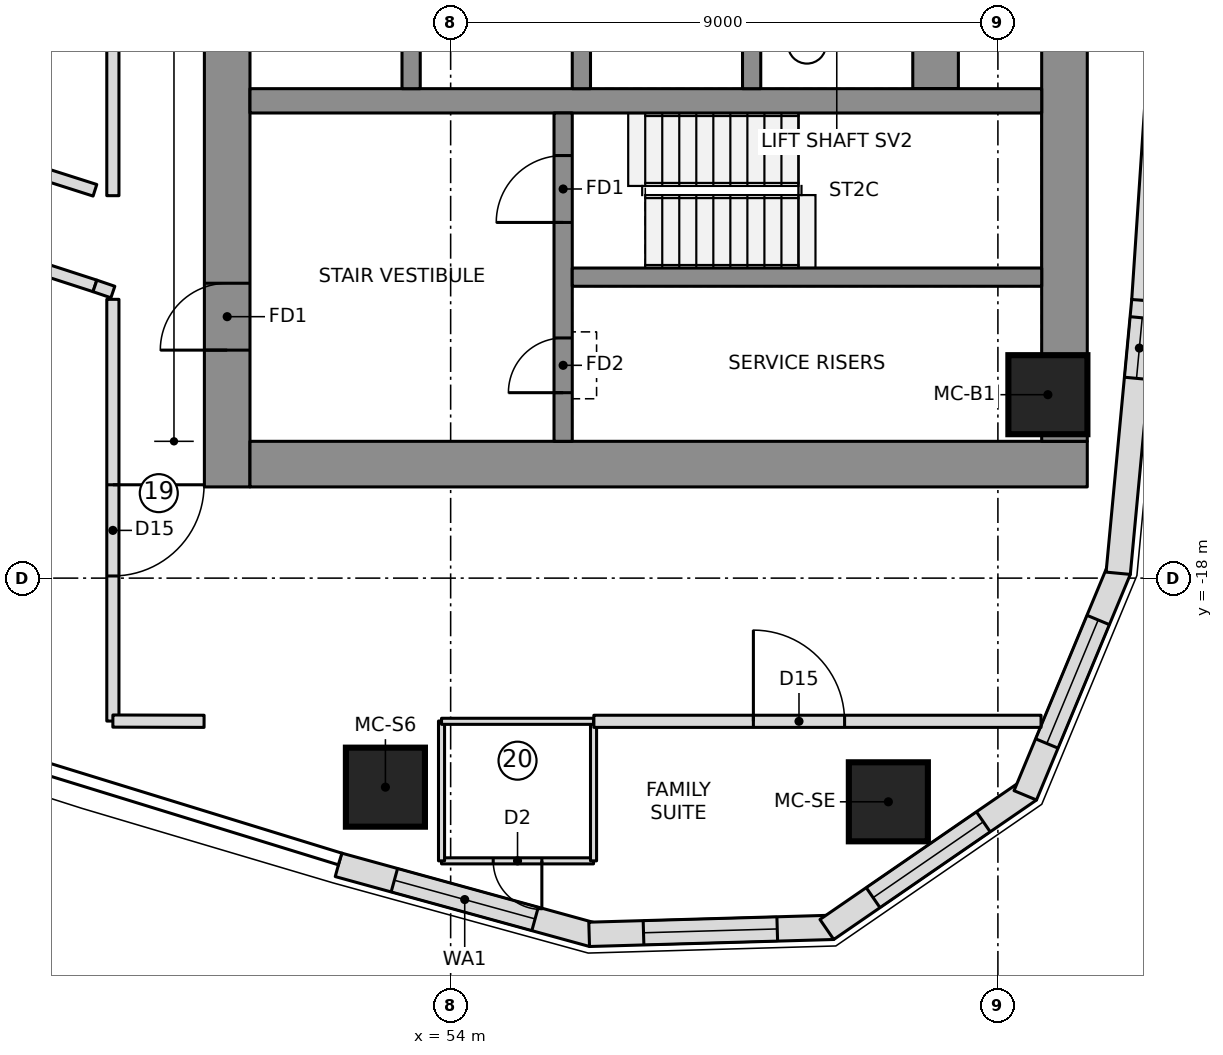
"""IFC4 building model, lengths in metres.
Left out: names, types, materials, properties, quantities, classifications, styles, units other than length and angle.
Written with IfcOpenShell. Run it as: python <this file> out.ifc"""

import sys

from ifc_helpers import new_model, si_unit, direction, frame, frame_2d, origin, origin_2d, place, context, subcontext, project, spatial, polyline, rectangle, outline, extrude, element, fill, save


model = new_model("IFC4")
c1 = context("Model", 3, precision=1e-05, world=origin(), true_north=direction((0.0, 1.0)))
c2 = subcontext(c1, "Body", "Model", "MODEL_VIEW")
j1 = project(units=[si_unit("LENGTHUNIT", "METRE"), si_unit("PLANEANGLEUNIT", "RADIAN")], contexts=[c1])
p1 = place(None, origin())
s1 = spatial("IfcSite", under=j1, at=p1, CompositionType="ELEMENT")
p2 = place(p1, origin())
s2 = spatial("IfcBuilding", under=s1, at=p2, CompositionType="ELEMENT")
p3 = place(p2, frame((0.0, 0.0, 182.6)))
s3 = spatial("IfcBuildingStorey", under=s2, at=p3, CompositionType="ELEMENT", Elevation=182.6)
p4 = place(p3, frame((50.325, -16.5, 0.0), z_axis=(0.0, 0.0, 1.0), x_axis=(0.0, 1.0, 0.0)))
e1 = element("IfcWall", 1, at=p4, inside=s3, PredefinedType="SHEAR", context=c2, shape_type="SweptSolid", body=[
    extrude(rectangle(XDim=9.85, YDim=0.75, at=frame_2d((4.925, 0.0))), origin(), (0.0, 0.0, 1.0), 3.55),
])
p5 = place(p4, frame((2.25, 0.0, 0.0)))
e2 = element("IfcOpeningElement", 2, at=p5, cuts=e1, PredefinedType="OPENING", context=c2, shape_type="SweptSolid", body=[
    extrude(rectangle(XDim=1.1, YDim=2.1, at=frame_2d((0.55, 1.05))), frame((0.0, 0.385, 0.0), z_axis=(0.0, -1.0, 0.0), x_axis=(1.0, 0.0, 0.0)), (0.0, 0.0, 1.0), 0.77),
])
p6 = place(p3, frame((50.7, -16.125, 0.0), z_axis=(0.0, 0.0, 1.0), x_axis=(1.0, 0.0, 0.0)))
e3 = element("IfcWall", 3, at=p6, inside=s3, PredefinedType="SHEAR", context=c2, shape_type="SweptSolid", body=[
    extrude(rectangle(XDim=13.77, YDim=0.75, at=frame_2d((6.885, 0.0))), origin(), (0.0, 0.0, 1.0), 3.55),
])
p7 = place(p3, frame((64.095, -15.75, 0.0), z_axis=(0.0, 0.0, 1.0), x_axis=(0.0, 1.0, 0.0)))
e4 = element("IfcWall", 4, at=p7, inside=s3, PredefinedType="SHEAR", context=c2, shape_type="SweptSolid", body=[
    extrude(rectangle(XDim=7.651, YDim=0.75, at=frame_2d((3.825, 0.0))), origin(), (0.0, 0.0, 1.0), 3.55),
])
p8 = place(p3, frame((61.975, -9.95, 0.0), z_axis=(0.0, 0.0, 1.0), x_axis=(0.0, 1.0, 0.0)))
e5 = element("IfcWall", 5, at=p8, inside=s3, PredefinedType="SHEAR", context=c2, shape_type="SweptSolid", body=[
    extrude(rectangle(XDim=19.9, YDim=0.75, at=frame_2d((9.95, 0.0))), origin(), (0.0, 0.0, 1.0), 3.55),
])
p9 = place(p3, frame((50.7, -10.15, 0.0), z_axis=(0.0, 0.0, 1.0), x_axis=(1.0, 0.0, 0.0)))
e6 = element("IfcWall", 6, at=p9, inside=s3, PredefinedType="SHEAR", context=c2, shape_type="SweptSolid", body=[
    extrude(rectangle(XDim=13.02, YDim=0.4, at=frame_2d((6.51, 0.0))), origin(), (0.0, 0.0, 1.0), 3.55),
])
for number, where, z_axis, x_axis in (
    (7, (53.35, -9.95, 0.0), (0.0, 0.0, 1.0), (0.0, 1.0, 0.0)),
    (8, (56.15, -9.95, 0.0), (0.0, 0.0, 1.0), (0.0, 1.0, 0.0)),
    (9, (58.95, -9.95, 0.0), (0.0, 0.0, 1.0), (0.0, 1.0, 0.0)),
):
    element("IfcWall", number, at=place(p3, frame(where, z_axis=z_axis, x_axis=x_axis)), inside=s3, PredefinedType="SHEAR", context=c2, shape_type="SweptSolid", body=[
        extrude(rectangle(XDim=3.0, YDim=0.3, at=frame_2d((1.5, 0.0))), origin(), (0.0, 0.0, 1.0), 3.55),
    ])
p10 = place(p3, frame((55.85, -15.75, 0.0), z_axis=(0.0, 0.0, 1.0), x_axis=(0.0, 1.0, 0.0)))
e10 = element("IfcWall", 10, at=p10, inside=s3, PredefinedType="SHEAR", context=c2, shape_type="SweptSolid", body=[
    extrude(rectangle(XDim=5.4, YDim=0.3, at=frame_2d((2.7, 0.0))), origin(), (0.0, 0.0, 1.0), 3.55),
])
p11 = place(p10, frame((3.6, 0.0, 0.0)))
e11 = element("IfcOpeningElement", 11, at=p11, cuts=e10, PredefinedType="OPENING", context=c2, shape_type="SweptSolid", body=[
    extrude(rectangle(XDim=1.1, YDim=2.1, at=frame_2d((0.55, 1.05))), frame((0.0, 0.16, 0.0), z_axis=(0.0, -1.0, 0.0), x_axis=(1.0, 0.0, 0.0)), (0.0, 0.0, 1.0), 0.32),
])
p12 = place(p10, frame((0.8, 0.0, 0.0)))
e12 = element("IfcOpeningElement", 12, at=p12, cuts=e10, PredefinedType="OPENING", context=c2, shape_type="SweptSolid", body=[
    extrude(rectangle(XDim=0.9, YDim=2.1, at=frame_2d((0.45, 1.05))), frame((0.0, 0.16, 0.0), z_axis=(0.0, -1.0, 0.0), x_axis=(1.0, 0.0, 0.0)), (0.0, 0.0, 1.0), 0.32),
])
p13 = place(p3, frame((56.0, -13.05, 0.0), z_axis=(0.0, 0.0, 1.0), x_axis=(1.0, 0.0, 0.0)))
e13 = element("IfcWall", 13, at=p13, inside=s3, PredefinedType="SHEAR", context=c2, shape_type="SweptSolid", body=[
    extrude(rectangle(XDim=7.72, YDim=0.3, at=frame_2d((3.86, 0.0))), origin(), (0.0, 0.0, 1.0), 3.55),
])
for number, where, z_axis, x_axis in (
    (14, (52.927, -21.438, 0.0), (0.0, 0.0, 1.0), (1.0, 0.0, 0.0)),
    (15, (61.198, -21.679, 0.0), (0.0, 0.0, 1.0), (1.0, 0.0, 0.0)),
    (16, (63.822, -14.983, 0.0), (0.0, 0.0, 1.0), (1.0, 0.0, 0.0)),
):
    element("IfcColumn", number, at=place(p3, frame(where, z_axis=z_axis, x_axis=x_axis)), inside=s3, PredefinedType="COLUMN", context=c2, shape_type="SweptSolid", body=[
        extrude(rectangle(XDim=1.3, YDim=1.3, at=origin_2d()), origin(), (0.0, 0.0, 1.0), 3.55),
    ])
p14 = place(p3, frame((52.155, -22.716, 0.0), z_axis=(0.0, 0.0, 1.0), x_axis=(0.964205755089, -0.265155165617, 0.0)))
e17 = element("IfcWall", 17, at=p14, inside=s3, PredefinedType="NOTDEFINED", context=c2, shape_type="SweptSolid", body=[
    extrude(outline(polyline([(0.0, -0.2), (4.337, -0.2), (4.277, 0.2), (0.0, 0.2), (0.0, -0.2)])), origin(), (0.0, 0.0, 1.0), 3.25),
])
p15 = place(p14, frame((0.954, 0.0, 0.5)))
e18 = element("IfcOpeningElement", 18, at=p15, cuts=e17, PredefinedType="OPENING", context=c2, shape_type="SweptSolid", body=[
    extrude(rectangle(XDim=2.4, YDim=2.0, at=frame_2d((1.2, 1.0))), frame((0.0, 0.21, 0.0), z_axis=(0.0, -1.0, 0.0), x_axis=(1.0, 0.0, 0.0)), (0.0, 0.0, 1.0), 0.42),
])
p16 = place(p3, frame((56.308, -23.858, 0.0), z_axis=(0.0, 0.0, 1.0), x_axis=(0.999587920197, 0.028705222472, 0.0)))
e19 = element("IfcWall", 19, at=p16, inside=s3, PredefinedType="NOTDEFINED", context=c2, shape_type="SweptSolid", body=[
    extrude(outline(polyline([(-0.03, -0.2), (3.989, -0.2), (3.87, 0.2), (0.03, 0.2), (-0.03, -0.2)])), origin(), (0.0, 0.0, 1.0), 3.25),
])
p17 = place(p16, frame((0.865, 0.0, 0.6)))
e20 = element("IfcOpeningElement", 20, at=p17, cuts=e19, PredefinedType="OPENING", context=c2, shape_type="SweptSolid", body=[
    extrude(outline(polyline([(0.0, 1.35), (0.084, 1.771), (0.322, 2.128), (0.679, 2.366), (1.1, 2.45), (1.521, 2.366), (1.878, 2.128), (2.116, 1.771), (2.2, 1.35), (2.2, 1.1), (2.116, 0.679), (1.878, 0.322), (1.521, 0.084), (1.1, 0.0), (0.679, 0.084), (0.322, 0.322), (0.084, 0.679), (0.0, 1.1), (0.0, 1.35)])), frame((0.0, 0.21, 0.0), z_axis=(0.0, -1.0, 0.0), x_axis=(1.0, 0.0, 0.0)), (0.0, 0.0, 1.0), 0.42),
])
p18 = place(p3, frame((60.236, -23.745, 0.0), z_axis=(0.0, 0.0, 1.0), x_axis=(0.823806162588, 0.566871596115, 0.0)))
e21 = element("IfcWall", 21, at=p18, inside=s3, PredefinedType="NOTDEFINED", context=c2, shape_type="SweptSolid", body=[
    extrude(outline(polyline([(-0.059, -0.2), (3.988, -0.2), (3.87, 0.2), (0.059, 0.2), (-0.059, -0.2)])), origin(), (0.0, 0.0, 1.0), 3.25),
])
p19 = place(p18, frame((0.865, 0.0, 0.6)))
e22 = element("IfcOpeningElement", 22, at=p19, cuts=e21, PredefinedType="OPENING", context=c2, shape_type="SweptSolid", body=[
    extrude(outline(polyline([(0.0, 1.35), (0.084, 1.771), (0.322, 2.128), (0.679, 2.366), (1.1, 2.45), (1.521, 2.366), (1.878, 2.128), (2.116, 1.771), (2.2, 1.35), (2.2, 1.1), (2.116, 0.679), (1.878, 0.322), (1.521, 0.084), (1.1, 0.0), (0.679, 0.084), (0.322, 0.322), (0.084, 0.679), (0.0, 1.1), (0.0, 1.35)])), frame((0.0, 0.21, 0.0), z_axis=(0.0, -1.0, 0.0), x_axis=(1.0, 0.0, 0.0)), (0.0, 0.0, 1.0), 0.42),
])
p20 = place(p3, frame((63.472, -21.518, 0.0), z_axis=(0.0, 0.0, 1.0), x_axis=(0.383997619794, 0.923334082547, 0.0)))
e23 = element("IfcWall", 23, at=p20, inside=s3, PredefinedType="NOTDEFINED", context=c2, shape_type="SweptSolid", body=[
    extrude(outline(polyline([(-0.059, -0.2), (3.959, -0.2), (3.899, 0.2), (0.059, 0.2), (-0.059, -0.2)])), origin(), (0.0, 0.0, 1.0), 3.25),
])
p21 = place(p20, frame((0.865, 0.0, 0.6)))
e24 = element("IfcOpeningElement", 24, at=p21, cuts=e23, PredefinedType="OPENING", context=c2, shape_type="SweptSolid", body=[
    extrude(outline(polyline([(0.0, 1.35), (0.084, 1.771), (0.322, 2.128), (0.679, 2.366), (1.1, 2.45), (1.521, 2.366), (1.878, 2.128), (2.116, 1.771), (2.2, 1.35), (2.2, 1.1), (2.116, 0.679), (1.878, 0.322), (1.521, 0.084), (1.1, 0.0), (0.679, 0.084), (0.322, 0.322), (0.084, 0.679), (0.0, 1.1), (0.0, 1.35)])), frame((0.0, 0.21, 0.0), z_axis=(0.0, -1.0, 0.0), x_axis=(1.0, 0.0, 0.0)), (0.0, 0.0, 1.0), 0.42),
])
p22 = place(p3, frame((64.981, -17.89, 0.0), z_axis=(0.0, 0.0, 1.0), x_axis=(0.093605694738, 0.995609348044, 0.0)))
e25 = element("IfcWall", 25, at=p22, inside=s3, PredefinedType="NOTDEFINED", context=c2, shape_type="SweptSolid", body=[
    extrude(outline(polyline([(-0.03, -0.2), (4.484, -0.2), (4.478, 0.2), (0.03, 0.2), (-0.03, -0.2)])), origin(), (0.0, 0.0, 1.0), 3.25),
])
p23 = place(p22, frame((3.189, 0.0, 0.5)))
e26 = element("IfcOpeningElement", 26, at=p23, cuts=e25, PredefinedType="OPENING", context=c2, shape_type="SweptSolid", body=[
    extrude(rectangle(XDim=1.0, YDim=2.0, at=frame_2d((0.5, 1.0))), frame((0.0, 0.21, 0.0), z_axis=(0.0, -1.0, 0.0), x_axis=(1.0, 0.0, 0.0)), (0.0, 0.0, 1.0), 0.42),
])
p24 = place(p3, frame((65.401, -13.429, 0.0), z_axis=(0.0, 0.0, 1.0), x_axis=(0.066905935948, 0.997759287471, 0.0)))
e27 = element("IfcWall", 27, at=p24, inside=s3, PredefinedType="NOTDEFINED", context=c2, shape_type="SweptSolid", body=[
    extrude(outline(polyline([(-0.003, -0.2), (4.484, -0.2), (4.478, 0.2), (0.003, 0.2), (-0.003, -0.2)])), origin(), (0.0, 0.0, 1.0), 3.25),
])
p25 = place(p3, frame((56.35, -22.65, 0.0), z_axis=(0.0, 0.0, 1.0), x_axis=(-1.0, 0.0, 0.0)))
e28 = element("IfcWall", 28, at=p25, inside=s3, PredefinedType="PARTITIONING", context=c2, shape_type="SweptSolid", body=[
    extrude(rectangle(XDim=2.5, YDim=0.1, at=frame_2d((1.25, 0.0))), origin(), (0.0, 0.0, 1.0), 3.25),
])
p26 = place(p25, frame((0.85, 0.0, 0.0)))
e29 = element("IfcOpeningElement", 29, at=p26, cuts=e28, PredefinedType="OPENING", context=c2, shape_type="SweptSolid", body=[
    extrude(rectangle(XDim=0.8, YDim=2.1, at=frame_2d((0.4, 1.05))), frame((0.0, 0.06, 0.0), z_axis=(0.0, -1.0, 0.0), x_axis=(1.0, 0.0, 0.0)), (0.0, 0.0, 1.0), 0.12),
])
for number, where, z_axis, x_axis in (
    (30, (53.85, -22.65, 0.0), (0.0, 0.0, 1.0), (0.0, 1.0, 0.0)),
    (31, (56.35, -20.35, 0.0), (0.0, 0.0, 1.0), (0.0, -1.0, 0.0)),
):
    element("IfcWall", number, at=place(p3, frame(where, z_axis=z_axis, x_axis=x_axis)), inside=s3, PredefinedType="PARTITIONING", context=c2, shape_type="SweptSolid", body=[
        extrude(rectangle(XDim=2.3, YDim=0.1, at=frame_2d((1.15, 0.0))), origin(), (0.0, 0.0, 1.0), 3.25),
    ])
p27 = place(p3, frame((56.355, -20.355, 0.0), z_axis=(0.0, 0.0, 1.0), x_axis=(1.0, 0.0, 0.0)))
e32 = element("IfcWall", 32, at=p27, inside=s3, PredefinedType="PARTITIONING", context=c2, shape_type="SweptSolid", body=[
    extrude(rectangle(XDim=7.354, YDim=0.2, at=frame_2d((3.677, 0.0))), origin(), (0.0, 0.0, 1.0), 3.25),
])
p28 = place(p27, frame((2.624, 0.0, 0.0)))
e33 = element("IfcOpeningElement", 33, at=p28, cuts=e32, PredefinedType="OPENING", context=c2, shape_type="SweptSolid", body=[
    extrude(rectangle(XDim=1.5, YDim=2.1, at=frame_2d((0.75, 1.05))), frame((0.0, 0.11, 0.0), z_axis=(0.0, -1.0, 0.0), x_axis=(1.0, 0.0, 0.0)), (0.0, 0.0, 1.0), 0.22),
])
p29 = place(p3, frame((53.85, -20.355, 0.0), z_axis=(0.0, 0.0, 1.0), x_axis=(1.0, 0.0, 0.0)))
e34 = element("IfcWall", 34, at=p29, inside=s3, PredefinedType="PARTITIONING", context=c2, shape_type="SweptSolid", body=[
    extrude(rectangle(XDim=2.5, YDim=0.1, at=frame_2d((1.25, 0.0))), origin(), (0.0, 0.0, 1.0), 3.25),
])
p30 = place(p3, frame((44.49, -12.007, 0.0), z_axis=(0.0, 0.0, 1.0), x_axis=(0.951228355446, -0.308487626648, 0.0)))
e35 = element("IfcWall", 35, at=p30, inside=s3, PredefinedType="PARTITIONING", context=c2, shape_type="SweptSolid", body=[
    extrude(rectangle(XDim=3.847, YDim=0.2, at=frame_2d((1.924, 0.0))), origin(), (0.0, 0.0, 1.0), 3.25),
])
p31 = place(p3, frame((48.15, -11.621, 0.0), z_axis=(0.0, 0.0, 1.0), x_axis=(-0.952761948983, 0.303718074157, 0.0)))
e36 = element("IfcWall", 36, at=p31, inside=s3, PredefinedType="PARTITIONING", context=c2, shape_type="SweptSolid", body=[
    extrude(rectangle(XDim=1.332, YDim=0.2, at=frame_2d((0.666, 0.0))), origin(), (0.0, 0.0, 1.0), 3.25),
])
p32 = place(p3, frame((48.445, 11.71, 0.0), z_axis=(0.0, 0.0, 1.0), x_axis=(0.0, -1.0, 0.0)))
e37 = element("IfcWall", 37, at=p32, inside=s3, PredefinedType="PARTITIONING", context=c2, shape_type="SweptSolid", body=[
    extrude(rectangle(XDim=23.42, YDim=0.2, at=frame_2d((11.71, 0.0))), origin(), (0.0, 0.0, 1.0), 3.25),
])
p33 = place(p3, frame((48.15, -13.194, 0.0), z_axis=(0.0, 0.0, 1.0), x_axis=(0.946069343286, -0.323964191994, 0.0)))
e38 = element("IfcWall", 38, at=p33, inside=s3, PredefinedType="PARTITIONING", context=c2, shape_type="SweptSolid", body=[
    extrude(rectangle(XDim=0.312, YDim=0.2, at=frame_2d((0.156, 0.0))), origin(), (0.0, 0.0, 1.0), 3.25),
])
p34 = place(p3, frame((48.445, -13.415, 0.0), z_axis=(0.0, 0.0, 1.0), x_axis=(0.0, -1.0, 0.0)))
e39 = element("IfcWall", 39, at=p34, inside=s3, PredefinedType="PARTITIONING", context=c2, shape_type="SweptSolid", body=[
    extrude(rectangle(XDim=6.936, YDim=0.2, at=frame_2d((3.468, 0.0))), origin(), (0.0, 0.0, 1.0), 3.25),
])
p35 = place(p34, frame((3.05, 0.0, 0.0)))
e40 = element("IfcOpeningElement", 40, at=p35, cuts=e39, PredefinedType="OPENING", context=c2, shape_type="SweptSolid", body=[
    extrude(rectangle(XDim=1.5, YDim=2.1, at=frame_2d((0.75, 1.05))), frame((0.0, 0.11, 0.0), z_axis=(0.0, -1.0, 0.0), x_axis=(1.0, 0.0, 0.0)), (0.0, 0.0, 1.0), 0.22),
])
p36 = place(p3, frame((48.445, -20.351, 0.0), z_axis=(0.0, 0.0, 1.0), x_axis=(0.999996609175, -0.002604157836, 0.0)))
e41 = element("IfcWall", 41, at=p36, inside=s3, PredefinedType="PARTITIONING", context=c2, shape_type="SweptSolid", body=[
    extrude(rectangle(XDim=1.5, YDim=0.2, at=frame_2d((0.75, 0.0))), origin(), (0.0, 0.0, 1.0), 3.25),
])
p37 = place(p15, origin())
e42 = element("IfcWindow", 42, at=p37, inside=s3, PartitioningType="SINGLE_PANEL", PredefinedType="WINDOW", context=c2, shape_type="SweptSolid", body=[
    extrude(rectangle(XDim=2.4, YDim=2.0, at=frame_2d((1.2, 1.0))), frame((0.0, 0.17, 0.0), z_axis=(0.0, -1.0, 0.0), x_axis=(1.0, 0.0, 0.0)), (0.0, 0.0, 1.0), 0.06),
])
fill(e18, e42)
p38 = place(p17, origin())
e43 = element("IfcWindow", 43, at=p38, inside=s3, PartitioningType="SINGLE_PANEL", PredefinedType="WINDOW", context=c2, shape_type="SweptSolid", body=[
    extrude(outline(polyline([(0.0, 1.35), (0.084, 1.771), (0.322, 2.128), (0.679, 2.366), (1.1, 2.45), (1.521, 2.366), (1.878, 2.128), (2.116, 1.771), (2.2, 1.35), (2.2, 1.1), (2.116, 0.679), (1.878, 0.322), (1.521, 0.084), (1.1, 0.0), (0.679, 0.084), (0.322, 0.322), (0.084, 0.679), (0.0, 1.1), (0.0, 1.35)])), frame((0.0, 0.17, 0.0), z_axis=(0.0, -1.0, 0.0), x_axis=(1.0, 0.0, 0.0)), (0.0, 0.0, 1.0), 0.06),
])
fill(e20, e43)
p39 = place(p19, origin())
e44 = element("IfcWindow", 44, at=p39, inside=s3, PartitioningType="SINGLE_PANEL", PredefinedType="WINDOW", context=c2, shape_type="SweptSolid", body=[
    extrude(outline(polyline([(0.0, 1.35), (0.084, 1.771), (0.322, 2.128), (0.679, 2.366), (1.1, 2.45), (1.521, 2.366), (1.878, 2.128), (2.116, 1.771), (2.2, 1.35), (2.2, 1.1), (2.116, 0.679), (1.878, 0.322), (1.521, 0.084), (1.1, 0.0), (0.679, 0.084), (0.322, 0.322), (0.084, 0.679), (0.0, 1.1), (0.0, 1.35)])), frame((0.0, 0.17, 0.0), z_axis=(0.0, -1.0, 0.0), x_axis=(1.0, 0.0, 0.0)), (0.0, 0.0, 1.0), 0.06),
])
fill(e22, e44)
p40 = place(p21, origin())
e45 = element("IfcWindow", 45, at=p40, inside=s3, PartitioningType="SINGLE_PANEL", PredefinedType="WINDOW", context=c2, shape_type="SweptSolid", body=[
    extrude(outline(polyline([(0.0, 1.35), (0.084, 1.771), (0.322, 2.128), (0.679, 2.366), (1.1, 2.45), (1.521, 2.366), (1.878, 2.128), (2.116, 1.771), (2.2, 1.35), (2.2, 1.1), (2.116, 0.679), (1.878, 0.322), (1.521, 0.084), (1.1, 0.0), (0.679, 0.084), (0.322, 0.322), (0.084, 0.679), (0.0, 1.1), (0.0, 1.35)])), frame((0.0, 0.17, 0.0), z_axis=(0.0, -1.0, 0.0), x_axis=(1.0, 0.0, 0.0)), (0.0, 0.0, 1.0), 0.06),
])
fill(e24, e45)
p41 = place(p23, origin())
e46 = element("IfcWindow", 46, at=p41, inside=s3, PartitioningType="SINGLE_PANEL", PredefinedType="WINDOW", context=c2, shape_type="SweptSolid", body=[
    extrude(rectangle(XDim=1.0, YDim=2.0, at=frame_2d((0.5, 1.0))), frame((0.0, 0.17, 0.0), z_axis=(0.0, -1.0, 0.0), x_axis=(1.0, 0.0, 0.0)), (0.0, 0.0, 1.0), 0.06),
])
fill(e26, e46)
p42 = place(p26, origin())
e47 = element("IfcDoor", 47, at=p42, inside=s3, OperationType="SINGLE_SWING_LEFT", PredefinedType="DOOR", context=c2, shape_type="SweptSolid", body=[
    extrude(rectangle(XDim=0.8, YDim=2.1, at=frame_2d((0.4, 1.05))), frame((0.0, 0.025, 0.0), z_axis=(0.0, -1.0, 0.0), x_axis=(1.0, 0.0, 0.0)), (0.0, 0.0, 1.0), 0.05),
])
fill(e29, e47)
p43 = place(p28, origin())
e48 = element("IfcDoor", 48, at=p43, inside=s3, OperationType="DOUBLE_DOOR_SINGLE_SWING", PredefinedType="DOOR", context=c2, shape_type="SweptSolid", body=[
    extrude(rectangle(XDim=1.5, YDim=2.1, at=frame_2d((0.75, 1.05))), frame((0.0, 0.025, 0.0), z_axis=(0.0, -1.0, 0.0), x_axis=(1.0, 0.0, 0.0)), (0.0, 0.0, 1.0), 0.05),
])
fill(e33, e48)
p44 = place(p35, origin())
e49 = element("IfcDoor", 49, at=p44, inside=s3, OperationType="DOUBLE_DOOR_SINGLE_SWING", PredefinedType="DOOR", context=c2, shape_type="SweptSolid", body=[
    extrude(rectangle(XDim=1.5, YDim=2.1, at=frame_2d((0.75, 1.05))), frame((0.0, 0.025, 0.0), z_axis=(0.0, -1.0, 0.0), x_axis=(1.0, 0.0, 0.0)), (0.0, 0.0, 1.0), 0.05),
])
fill(e40, e49)
p45 = place(p11, origin())
e50 = element("IfcDoor", 50, at=p45, inside=s3, OperationType="SINGLE_SWING_RIGHT", PredefinedType="DOOR", context=c2, shape_type="SweptSolid", body=[
    extrude(rectangle(XDim=1.1, YDim=2.1, at=frame_2d((0.55, 1.05))), frame((0.0, 0.025, 0.0), z_axis=(0.0, -1.0, 0.0), x_axis=(1.0, 0.0, 0.0)), (0.0, 0.0, 1.0), 0.05),
])
fill(e11, e50)
p46 = place(p5, origin())
e51 = element("IfcDoor", 51, at=p46, inside=s3, OperationType="SINGLE_SWING_RIGHT", PredefinedType="DOOR", context=c2, shape_type="SweptSolid", body=[
    extrude(rectangle(XDim=1.1, YDim=2.1, at=frame_2d((0.55, 1.05))), frame((0.0, 0.025, 0.0), z_axis=(0.0, -1.0, 0.0), x_axis=(1.0, 0.0, 0.0)), (0.0, 0.0, 1.0), 0.05),
])
fill(e2, e51)
p47 = place(p12, origin())
e52 = element("IfcDoor", 52, at=p47, inside=s3, OperationType="SINGLE_SWING_LEFT", PredefinedType="DOOR", context=c2, shape_type="SweptSolid", body=[
    extrude(rectangle(XDim=0.9, YDim=2.1, at=frame_2d((0.45, 1.05))), frame((0.0, 0.025, 0.0), z_axis=(0.0, -1.0, 0.0), x_axis=(1.0, 0.0, 0.0)), (0.0, 0.0, 1.0), 0.05),
])
fill(e12, e52)
save(model, sys.argv[1])
